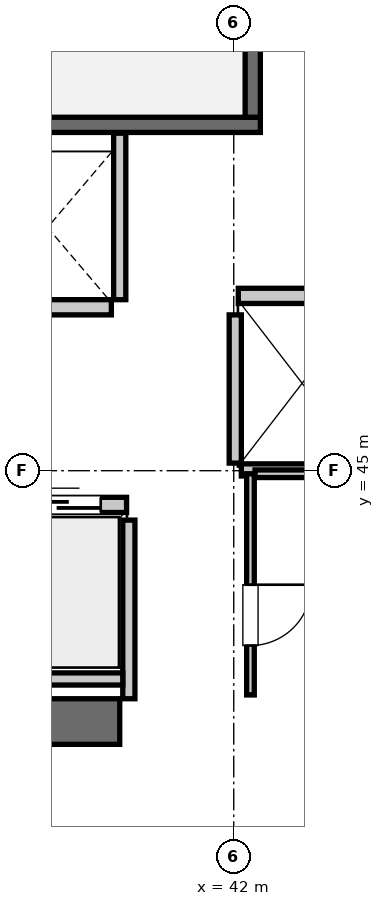
"""IFC4 building model, lengths in metres.
Left out: names, types, materials, properties, quantities, classifications, styles, units other than length and angle.
Written with IfcOpenShell. Run it as: python <this file> out.ifc"""

import sys

from ifc_helpers import new_model, si_unit, direction, frame, frame_2d, origin, place, context, subcontext, project, spatial, rectangle, extrude, element, fill, save


model = new_model("IFC4")
c1 = context("Model", 3, precision=1e-05, world=origin(), true_north=direction((0.0, 1.0)))
c2 = subcontext(c1, "Body", "Model", "MODEL_VIEW")
j1 = project(units=[si_unit("LENGTHUNIT", "METRE"), si_unit("PLANEANGLEUNIT", "RADIAN")], contexts=[c1])
p1 = place(None, origin())
s1 = spatial("IfcSite", under=j1, at=p1, CompositionType="ELEMENT")
p2 = place(p1, origin())
s2 = spatial("IfcBuilding", under=s1, at=p2, CompositionType="ELEMENT")
p3 = place(p2, frame((0.0, 0.0, 239.4)))
s3 = spatial("IfcBuildingStorey", under=s2, at=p3, CompositionType="ELEMENT", Elevation=239.4)
p4 = place(p3, frame((35.1, 41.7, 0.0), z_axis=(0.0, 0.0, 1.0), x_axis=(1.0, 0.0, 0.0)))
e1 = element("IfcWall", 1, at=p4, inside=s3, PredefinedType="SHEAR", context=c2, shape_type="SweptSolid", body=[
    extrude(rectangle(XDim=5.4, YDim=0.6, at=frame_2d((2.7, 0.0))), origin(), (0.0, 0.0, 1.0), 3.85),
])
p5 = place(p3, frame((33.25, 49.55, 0.0), z_axis=(0.0, 0.0, 1.0), x_axis=(1.0, 0.0, 0.0)))
e2 = element("IfcWall", 2, at=p5, inside=s3, PredefinedType="SOLIDWALL", context=c2, shape_type="SweptSolid", body=[
    extrude(rectangle(XDim=9.1, YDim=0.2, at=frame_2d((4.55, 0.0))), origin(), (0.0, 0.0, 1.0), 3.61),
])
p6 = place(p3, frame((42.25, 49.65, 0.0), z_axis=(0.0, 0.0, 1.0), x_axis=(0.0, 1.0, 0.0)))
e3 = element("IfcWall", 3, at=p6, inside=s3, PredefinedType="SOLIDWALL", context=c2, shape_type="SweptSolid", body=[
    extrude(rectangle(XDim=3.75, YDim=0.2, at=frame_2d((1.875, 0.0))), origin(), (0.0, 0.0, 1.0), 3.61),
])
p7 = place(p3, frame((42.06, 47.3, 0.0), z_axis=(0.0, 0.0, 1.0), x_axis=(1.0, 0.0, 0.0)))
e4 = element("IfcWall", 4, at=p7, inside=s3, PredefinedType="SOLIDWALL", context=c2, shape_type="SweptSolid", body=[
    extrude(rectangle(XDim=1.68, YDim=0.2, at=frame_2d((0.84, 0.0))), origin(), (0.0, 0.0, 1.0), 3.61),
])
p8 = place(p3, frame((38.91, 44.55, 0.0), z_axis=(0.0, 0.0, 1.0), x_axis=(1.0, 0.0, 0.0)))
e5 = element("IfcWall", 5, at=p8, inside=s3, PredefinedType="SOLIDWALL", context=c2, shape_type="SweptSolid", body=[
    extrude(rectangle(XDim=1.68, YDim=0.2, at=frame_2d((0.84, 0.0))), origin(), (0.0, 0.0, 1.0), 3.61),
])
p9 = place(p8, frame((0.34, 0.0, 0.0)))
e6 = element("IfcOpeningElement", 6, at=p9, cuts=e5, PredefinedType="OPENING", context=c2, shape_type="SweptSolid", body=[
    extrude(rectangle(XDim=1.0, YDim=2.15, at=frame_2d((0.5, 1.075))), frame((0.0, 0.11, 0.0), z_axis=(0.0, -1.0, 0.0), x_axis=(1.0, 0.0, 0.0)), (0.0, 0.0, 1.0), 0.22),
])
p10 = place(p3, frame((38.71, 47.15, 0.0), z_axis=(0.0, 0.0, 1.0), x_axis=(1.0, 0.0, 0.0)))
e7 = element("IfcWall", 7, at=p10, inside=s3, PredefinedType="SOLIDWALL", context=c2, shape_type="SweptSolid", body=[
    extrude(rectangle(XDim=1.68, YDim=0.2, at=frame_2d((0.84, 0.0))), origin(), (0.0, 0.0, 1.0), 3.61),
])
p11 = place(p3, frame((42.02, 45.1, 0.0), z_axis=(0.0, 0.0, 1.0), x_axis=(0.0, 1.0, 0.0)))
e8 = element("IfcWall", 8, at=p11, inside=s3, PredefinedType="SOLIDWALL", context=c2, shape_type="SweptSolid", body=[
    extrude(rectangle(XDim=1.95, YDim=0.16, at=frame_2d((0.975, 0.0))), origin(), (0.0, 0.0, 1.0), 3.61),
])
p12 = place(p3, frame((42.1, 45.01, 0.0), z_axis=(0.0, 0.0, 1.0), x_axis=(1.0, 0.0, 0.0)))
e9 = element("IfcWall", 9, at=p12, inside=s3, PredefinedType="SOLIDWALL", context=c2, shape_type="SweptSolid", body=[
    extrude(rectangle(XDim=3.45, YDim=0.16, at=frame_2d((1.725, 0.0))), origin(), (0.0, 0.0, 1.0), 3.61),
])
p13 = place(p3, frame((40.62, 42.0, 0.0), z_axis=(0.0, 0.0, 1.0), x_axis=(0.0, 1.0, 0.0)))
e10 = element("IfcWall", 10, at=p13, inside=s3, PredefinedType="SOLIDWALL", context=c2, shape_type="SweptSolid", body=[
    extrude(rectangle(XDim=2.35, YDim=0.16, at=frame_2d((1.175, 0.0))), origin(), (0.0, 0.0, 1.0), 3.61),
])
p14 = place(p3, frame((35.52, 42.26, 0.0), z_axis=(0.0, 0.0, 1.0), x_axis=(1.0, 0.0, 0.0)))
e11 = element("IfcWall", 11, at=p14, inside=s3, PredefinedType="SOLIDWALL", context=c2, shape_type="SweptSolid", body=[
    extrude(rectangle(XDim=5.02, YDim=0.16, at=frame_2d((2.51, 0.0))), origin(), (0.0, 0.0, 1.0), 3.61),
])
p15 = place(p3, frame((40.5, 47.25, 0.0), z_axis=(0.0, 0.0, 1.0), x_axis=(0.0, 1.0, 0.0)))
e12 = element("IfcWall", 12, at=p15, inside=s3, PredefinedType="SOLIDWALL", context=c2, shape_type="SweptSolid", body=[
    extrude(rectangle(XDim=2.19, YDim=0.16, at=frame_2d((1.095, 0.0))), origin(), (0.0, 0.0, 1.0), 3.61),
])
p16 = place(p3, frame((42.22, 42.05, 0.0), z_axis=(0.0, 0.0, 1.0), x_axis=(0.0, 1.0, 0.0)))
e13 = element("IfcWall", 13, at=p16, inside=s3, PredefinedType="PARTITIONING", context=c2, shape_type="SweptSolid", body=[
    extrude(rectangle(XDim=2.91, YDim=0.1, at=frame_2d((1.455, 0.0))), origin(), (0.0, 0.0, 1.0), 3.61),
])
p17 = place(p16, frame((0.65, 0.0, 0.0)))
e14 = element("IfcOpeningElement", 14, at=p17, cuts=e13, PredefinedType="OPENING", context=c2, shape_type="SweptSolid", body=[
    extrude(rectangle(XDim=0.8, YDim=2.05, at=frame_2d((0.4, 1.025))), frame((0.0, 0.06, 0.0), z_axis=(0.0, -1.0, 0.0), x_axis=(1.0, 0.0, 0.0)), (0.0, 0.0, 1.0), 0.12),
])
p18 = place(p3, frame((42.28, 44.96, 0.0), z_axis=(0.0, 0.0, 1.0), x_axis=(1.0, 0.0, 0.0)))
e15 = element("IfcWall", 15, at=p18, inside=s3, PredefinedType="PARTITIONING", context=c2, shape_type="SweptSolid", body=[
    extrude(rectangle(XDim=1.3, YDim=0.1, at=frame_2d((0.65, 0.0))), origin(), (0.0, 0.0, 1.0), 3.61),
])
p19 = place(p9, origin())
e16 = element("IfcDoor", 16, at=p19, inside=s3, OperationType="SLIDING_TO_LEFT", PredefinedType="DOOR", context=c2, shape_type="SweptSolid", body=[
    extrude(rectangle(XDim=1.0, YDim=2.15, at=frame_2d((0.5, 1.075))), frame((0.0, 0.025, 0.0), z_axis=(0.0, -1.0, 0.0), x_axis=(1.0, 0.0, 0.0)), (0.0, 0.0, 1.0), 0.05),
])
fill(e6, e16)
p20 = place(p17, frame((0.8, 0.0, 0.0), z_axis=(0.0, 0.0, 1.0), x_axis=(-1.0, 0.0, 0.0)))
e17 = element("IfcDoor", 17, at=p20, inside=s3, OperationType="SINGLE_SWING_LEFT", PredefinedType="DOOR", context=c2, shape_type="SweptSolid", body=[
    extrude(rectangle(XDim=0.8, YDim=2.05, at=frame_2d((0.4, 1.025))), frame((0.0, 0.025, 0.0), z_axis=(0.0, -1.0, 0.0), x_axis=(1.0, 0.0, 0.0)), (0.0, 0.0, 1.0), 0.05),
])
fill(e14, e17)
save(model, sys.argv[1])
